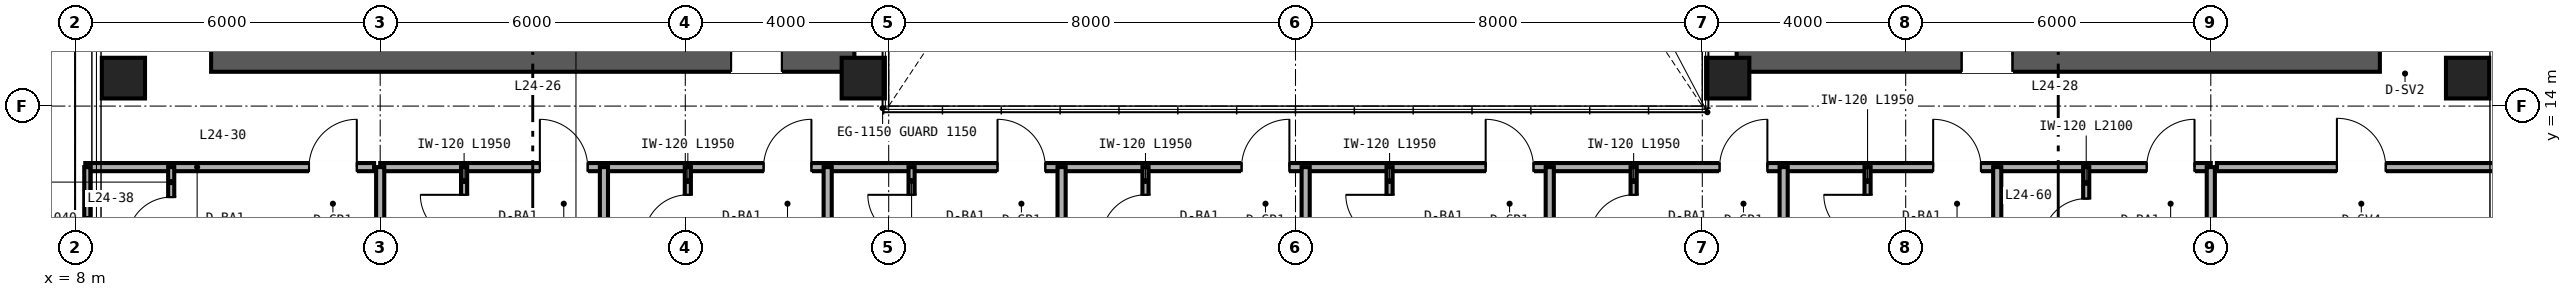
"""IFC4 building model, lengths in metres.
Left out: names, types, materials, properties, quantities, classifications, styles, units other than length and angle.
Written with IfcOpenShell. Run it as: python <this file> out.ifc"""

import sys

from ifc_helpers import new_model, si_unit, direction, frame, frame_2d, origin, origin_2d, place, context, subcontext, project, spatial, rectangle, hollow_rectangle, extrude, source, transform, mapped, element, fill, save


model = new_model("IFC4")
c1 = context("Model", 3, precision=1e-05, world=origin(), true_north=direction((0.0, 1.0)))
c2 = subcontext(c1, "Body", "Model", "MODEL_VIEW")
j1 = project(units=[si_unit("LENGTHUNIT", "METRE"), si_unit("PLANEANGLEUNIT", "RADIAN")], contexts=[c1])
p1 = place(None, origin())
s1 = spatial("IfcSite", under=j1, at=p1, CompositionType="ELEMENT")
p2 = place(p1, origin())
s2 = spatial("IfcBuilding", under=s1, at=p2, CompositionType="ELEMENT")
p3 = place(p2, frame((0.0, 0.0, 100.8)))
s3 = spatial("IfcBuildingStorey", under=s2, at=p3, CompositionType="ELEMENT", Elevation=100.8)
p4 = place(p3, frame((10.675, 15.0, 0.0), z_axis=(0.0, 0.0, 1.0), x_axis=(1.0, 0.0, 0.0)))
e1 = element("IfcWall", 1, at=p4, inside=s3, PredefinedType="SHEAR", context=c2, shape_type="SweptSolid", body=[
    extrude(rectangle(XDim=12.65, YDim=0.65, at=frame_2d((6.325, 0.0))), origin(), (0.0, 0.0, 1.0), 3.36),
])
p5 = place(p4, frame((10.225, 0.0, 0.0)))
e2 = element("IfcOpeningElement", 2, at=p5, cuts=e1, PredefinedType="OPENING", context=c2, shape_type="SweptSolid", body=[
    extrude(rectangle(XDim=1.0, YDim=2.15, at=frame_2d((0.5, 1.075))), frame((0.0, 0.335, 0.0), z_axis=(0.0, -1.0, 0.0), x_axis=(1.0, 0.0, 0.0)), (0.0, 0.0, 1.0), 0.67),
])
p6 = place(p3, frame((40.675, 15.0, 0.0), z_axis=(0.0, 0.0, 1.0), x_axis=(1.0, 0.0, 0.0)))
e3 = element("IfcWall", 3, at=p6, inside=s3, PredefinedType="SHEAR", context=c2, shape_type="SweptSolid", body=[
    extrude(rectangle(XDim=12.65, YDim=0.65, at=frame_2d((6.325, 0.0))), origin(), (0.0, 0.0, 1.0), 3.36),
])
p7 = place(p6, frame((4.425, 0.0, 0.0)))
e4 = element("IfcOpeningElement", 4, at=p7, cuts=e3, PredefinedType="OPENING", context=c2, shape_type="SweptSolid", body=[
    extrude(rectangle(XDim=1.0, YDim=2.15, at=frame_2d((0.5, 1.075))), frame((0.0, 0.335, 0.0), z_axis=(0.0, -1.0, 0.0), x_axis=(1.0, 0.0, 0.0)), (0.0, 0.0, 1.0), 0.67),
])
m1 = source(origin(), c2, "Body", "SweptSolid", [
    extrude(hollow_rectangle(XDim=0.85, YDim=0.8, WallThickness=0.032, at=origin_2d()), origin(), (0.0, 0.0, 1.0), 3.36),
])
for number, where, z_axis, x_axis in (
    (5, (8.95, 14.55, 0.0), (0.0, 0.0, 1.0), (1.0, 0.0, 0.0)),
    (6, (23.5, 14.55, 0.0), (0.0, 0.0, 1.0), (1.0, 0.0, 0.0)),
    (7, (40.5, 14.55, 0.0), (0.0, 0.0, 1.0), (1.0, 0.0, 0.0)),
    (8, (55.05, 14.55, 0.0), (0.0, 0.0, 1.0), (1.0, 0.0, 0.0)),
):
    element("IfcColumn", number, at=place(p3, frame(where, z_axis=z_axis, x_axis=x_axis)), inside=s3, PredefinedType="COLUMN", context=c2, shape_type="MappedRepresentation", body=[
        mapped(m1, transform((0.0, 0.0, 0.0), scale=1.0)),
    ])
p8 = place(p3, frame((8.2, 12.8, 0.0), z_axis=(0.0, 0.0, 1.0), x_axis=(1.0, 0.0, 0.0)))
e9 = element("IfcWall", 9, at=p8, inside=s3, PredefinedType="PARTITIONING", context=c2, shape_type="SweptSolid", body=[
    extrude(rectangle(XDim=5.68, YDim=0.16, at=frame_2d((2.84, 0.0))), origin(), (0.0, 0.0, 1.0), 3.36),
])
p9 = place(p8, frame((4.4, 0.0, 0.0)))
e10 = element("IfcOpeningElement", 10, at=p9, cuts=e9, PredefinedType="OPENING", context=c2, shape_type="SweptSolid", body=[
    extrude(rectangle(XDim=0.94, YDim=2.15, at=frame_2d((0.47, 1.075))), frame((0.0, 0.09, 0.0), z_axis=(0.0, -1.0, 0.0), x_axis=(1.0, 0.0, 0.0)), (0.0, 0.0, 1.0), 0.18),
])
p10 = place(p3, frame((9.89, 10.76, 0.0), z_axis=(0.0, 0.0, 1.0), x_axis=(0.0, 1.0, 0.0)))
e11 = element("IfcWall", 11, at=p10, inside=s3, PredefinedType="PARTITIONING", context=c2, shape_type="SweptSolid", body=[
    extrude(rectangle(XDim=2.04, YDim=0.12, at=frame_2d((1.02, 0.0))), origin(), (0.0, 0.0, 1.0), 3.36),
])
p11 = place(p10, frame((0.59, 0.0, 0.0)))
e12 = element("IfcOpeningElement", 12, at=p11, cuts=e11, PredefinedType="OPENING", context=c2, shape_type="SweptSolid", body=[
    extrude(rectangle(XDim=0.86, YDim=2.1, at=frame_2d((0.43, 1.05))), frame((0.0, 0.07, 0.0), z_axis=(0.0, -1.0, 0.0), x_axis=(1.0, 0.0, 0.0)), (0.0, 0.0, 1.0), 0.14),
])
p12 = place(p3, frame((8.24, 10.76, 0.0), z_axis=(0.0, 0.0, 1.0), x_axis=(0.0, 1.0, 0.0)))
e13 = element("IfcWall", 13, at=p12, inside=s3, PredefinedType="PARTITIONING", context=c2, shape_type="SweptSolid", body=[
    extrude(rectangle(XDim=2.04, YDim=0.12, at=frame_2d((1.02, 0.0))), origin(), (0.0, 0.0, 1.0), 3.36),
])
p13 = place(p3, frame((50.12, 12.8, 0.0), z_axis=(0.0, 0.0, 1.0), x_axis=(1.0, 0.0, 0.0)))
e14 = element("IfcWall", 14, at=p13, inside=s3, PredefinedType="PARTITIONING", context=c2, shape_type="SweptSolid", body=[
    extrude(rectangle(XDim=5.68, YDim=0.16, at=frame_2d((2.84, 0.0))), origin(), (0.0, 0.0, 1.0), 3.36),
])
p14 = place(p13, frame((2.36, 0.0, 0.0)))
e15 = element("IfcOpeningElement", 15, at=p14, cuts=e14, PredefinedType="OPENING", context=c2, shape_type="SweptSolid", body=[
    extrude(rectangle(XDim=0.96, YDim=2.15, at=frame_2d((0.48, 1.075))), frame((0.0, 0.09, 0.0), z_axis=(0.0, -1.0, 0.0), x_axis=(1.0, 0.0, 0.0)), (0.0, 0.0, 1.0), 0.18),
])
p15 = place(p3, frame((14.0, 12.8, 0.0), z_axis=(0.0, 0.0, 1.0), x_axis=(1.0, 0.0, 0.0)))
e16 = element("IfcWall", 16, at=p15, inside=s3, PredefinedType="PARTITIONING", context=c2, shape_type="SweptSolid", body=[
    extrude(rectangle(XDim=36.0, YDim=0.16, at=frame_2d((18.0, 0.0))), origin(), (0.0, 0.0, 1.0), 2.581),
])
p16 = place(p15, frame((3.14, 0.0, 0.0)))
e17 = element("IfcOpeningElement", 17, at=p16, cuts=e16, PredefinedType="OPENING", context=c2, shape_type="SweptSolid", body=[
    extrude(rectangle(XDim=0.94, YDim=2.15, at=frame_2d((0.47, 1.075))), frame((0.0, 0.09, 0.0), z_axis=(0.0, -1.0, 0.0), x_axis=(1.0, 0.0, 0.0)), (0.0, 0.0, 1.0), 0.18),
])
p17 = place(p15, frame((7.54, 0.0, 0.0)))
e18 = element("IfcOpeningElement", 18, at=p17, cuts=e16, PredefinedType="OPENING", context=c2, shape_type="SweptSolid", body=[
    extrude(rectangle(XDim=0.94, YDim=2.15, at=frame_2d((0.47, 1.075))), frame((0.0, 0.09, 0.0), z_axis=(0.0, -1.0, 0.0), x_axis=(1.0, 0.0, 0.0)), (0.0, 0.0, 1.0), 0.18),
])
p18 = place(p15, frame((12.14, 0.0, 0.0)))
e19 = element("IfcOpeningElement", 19, at=p18, cuts=e16, PredefinedType="OPENING", context=c2, shape_type="SweptSolid", body=[
    extrude(rectangle(XDim=0.94, YDim=2.15, at=frame_2d((0.47, 1.075))), frame((0.0, 0.09, 0.0), z_axis=(0.0, -1.0, 0.0), x_axis=(1.0, 0.0, 0.0)), (0.0, 0.0, 1.0), 0.18),
])
p19 = place(p15, frame((16.94, 0.0, 0.0)))
e20 = element("IfcOpeningElement", 20, at=p19, cuts=e16, PredefinedType="OPENING", context=c2, shape_type="SweptSolid", body=[
    extrude(rectangle(XDim=0.94, YDim=2.15, at=frame_2d((0.47, 1.075))), frame((0.0, 0.09, 0.0), z_axis=(0.0, -1.0, 0.0), x_axis=(1.0, 0.0, 0.0)), (0.0, 0.0, 1.0), 0.18),
])
p20 = place(p15, frame((21.74, 0.0, 0.0)))
e21 = element("IfcOpeningElement", 21, at=p20, cuts=e16, PredefinedType="OPENING", context=c2, shape_type="SweptSolid", body=[
    extrude(rectangle(XDim=0.94, YDim=2.15, at=frame_2d((0.47, 1.075))), frame((0.0, 0.09, 0.0), z_axis=(0.0, -1.0, 0.0), x_axis=(1.0, 0.0, 0.0)), (0.0, 0.0, 1.0), 0.18),
])
p21 = place(p15, frame((26.34, 0.0, 0.0)))
e22 = element("IfcOpeningElement", 22, at=p21, cuts=e16, PredefinedType="OPENING", context=c2, shape_type="SweptSolid", body=[
    extrude(rectangle(XDim=0.94, YDim=2.15, at=frame_2d((0.47, 1.075))), frame((0.0, 0.09, 0.0), z_axis=(0.0, -1.0, 0.0), x_axis=(1.0, 0.0, 0.0)), (0.0, 0.0, 1.0), 0.18),
])
p22 = place(p15, frame((30.54, 0.0, 0.0)))
e23 = element("IfcOpeningElement", 23, at=p22, cuts=e16, PredefinedType="OPENING", context=c2, shape_type="SweptSolid", body=[
    extrude(rectangle(XDim=0.94, YDim=2.15, at=frame_2d((0.47, 1.075))), frame((0.0, 0.09, 0.0), z_axis=(0.0, -1.0, 0.0), x_axis=(1.0, 0.0, 0.0)), (0.0, 0.0, 1.0), 0.18),
])
p23 = place(p15, frame((34.74, 0.0, 0.0)))
e24 = element("IfcOpeningElement", 24, at=p23, cuts=e16, PredefinedType="OPENING", context=c2, shape_type="SweptSolid", body=[
    extrude(rectangle(XDim=0.94, YDim=2.15, at=frame_2d((0.47, 1.075))), frame((0.0, 0.09, 0.0), z_axis=(0.0, -1.0, 0.0), x_axis=(1.0, 0.0, 0.0)), (0.0, 0.0, 1.0), 0.18),
])
for number, where, z_axis, x_axis in (
    (25, (14.0, 2.36, 0.0), (0.0, 0.0, 1.0), (0.0, 1.0, 0.0)),
    (26, (50.0, 2.36, 0.0), (0.0, 0.0, 1.0), (0.0, 1.0, 0.0)),
    (27, (18.4, 2.36, 0.0), (0.0, 0.0, 1.0), (0.0, 1.0, 0.0)),
):
    element("IfcWall", number, at=place(p3, frame(where, z_axis=z_axis, x_axis=x_axis)), inside=s3, PredefinedType="PARTITIONING", context=c2, shape_type="SweptSolid", body=[
        extrude(rectangle(XDim=10.44, YDim=0.16, at=frame_2d((5.22, 0.0))), origin(), (0.0, 0.0, 1.0), 2.667),
    ])
p24 = place(p3, frame((15.65, 10.85, 0.0), z_axis=(0.0, 0.0, 1.0), x_axis=(0.0, 1.0, 0.0)))
e28 = element("IfcWall", 28, at=p24, inside=s3, PredefinedType="PARTITIONING", context=c2, shape_type="SweptSolid", body=[
    extrude(rectangle(XDim=1.95, YDim=0.12, at=frame_2d((0.975, 0.0))), origin(), (0.0, 0.0, 1.0), 3.36),
])
p25 = place(p24, frame((0.545, 0.0, 0.0)))
e29 = element("IfcOpeningElement", 29, at=p25, cuts=e28, PredefinedType="OPENING", context=c2, shape_type="SweptSolid", body=[
    extrude(rectangle(XDim=0.86, YDim=2.1, at=frame_2d((0.43, 1.05))), frame((0.0, 0.07, 0.0), z_axis=(0.0, -1.0, 0.0), x_axis=(1.0, 0.0, 0.0)), (0.0, 0.0, 1.0), 0.14),
])
p26 = place(p3, frame((22.8, 2.36, 0.0), z_axis=(0.0, 0.0, 1.0), x_axis=(0.0, 1.0, 0.0)))
e30 = element("IfcWall", 30, at=p26, inside=s3, PredefinedType="PARTITIONING", context=c2, shape_type="SweptSolid", body=[
    extrude(rectangle(XDim=10.44, YDim=0.16, at=frame_2d((5.22, 0.0))), origin(), (0.0, 0.0, 1.0), 2.823),
])
p27 = place(p3, frame((20.05, 10.85, 0.0), z_axis=(0.0, 0.0, 1.0), x_axis=(0.0, 1.0, 0.0)))
e31 = element("IfcWall", 31, at=p27, inside=s3, PredefinedType="PARTITIONING", context=c2, shape_type="SweptSolid", body=[
    extrude(rectangle(XDim=1.95, YDim=0.12, at=frame_2d((0.975, 0.0))), origin(), (0.0, 0.0, 1.0), 3.36),
])
p28 = place(p27, frame((0.545, 0.0, 0.0)))
e32 = element("IfcOpeningElement", 32, at=p28, cuts=e31, PredefinedType="OPENING", context=c2, shape_type="SweptSolid", body=[
    extrude(rectangle(XDim=0.86, YDim=2.1, at=frame_2d((0.43, 1.05))), frame((0.0, 0.07, 0.0), z_axis=(0.0, -1.0, 0.0), x_axis=(1.0, 0.0, 0.0)), (0.0, 0.0, 1.0), 0.14),
])
p29 = place(p3, frame((27.4, 2.36, 0.0), z_axis=(0.0, 0.0, 1.0), x_axis=(0.0, 1.0, 0.0)))
e33 = element("IfcWall", 33, at=p29, inside=s3, PredefinedType="PARTITIONING", context=c2, shape_type="SweptSolid", body=[
    extrude(rectangle(XDim=10.44, YDim=0.16, at=frame_2d((5.22, 0.0))), origin(), (0.0, 0.0, 1.0), 2.433),
])
p30 = place(p3, frame((24.45, 10.85, 0.0), z_axis=(0.0, 0.0, 1.0), x_axis=(0.0, 1.0, 0.0)))
e34 = element("IfcWall", 34, at=p30, inside=s3, PredefinedType="PARTITIONING", context=c2, shape_type="SweptSolid", body=[
    extrude(rectangle(XDim=1.95, YDim=0.12, at=frame_2d((0.975, 0.0))), origin(), (0.0, 0.0, 1.0), 3.36),
])
p31 = place(p30, frame((0.545, 0.0, 0.0)))
e35 = element("IfcOpeningElement", 35, at=p31, cuts=e34, PredefinedType="OPENING", context=c2, shape_type="SweptSolid", body=[
    extrude(rectangle(XDim=0.86, YDim=2.1, at=frame_2d((0.43, 1.05))), frame((0.0, 0.07, 0.0), z_axis=(0.0, -1.0, 0.0), x_axis=(1.0, 0.0, 0.0)), (0.0, 0.0, 1.0), 0.14),
])
p32 = place(p3, frame((32.2, 2.36, 0.0), z_axis=(0.0, 0.0, 1.0), x_axis=(0.0, 1.0, 0.0)))
e36 = element("IfcWall", 36, at=p32, inside=s3, PredefinedType="PARTITIONING", context=c2, shape_type="SweptSolid", body=[
    extrude(rectangle(XDim=10.44, YDim=0.16, at=frame_2d((5.22, 0.0))), origin(), (0.0, 0.0, 1.0), 2.433),
])
p33 = place(p3, frame((29.05, 10.85, 0.0), z_axis=(0.0, 0.0, 1.0), x_axis=(0.0, 1.0, 0.0)))
e37 = element("IfcWall", 37, at=p33, inside=s3, PredefinedType="PARTITIONING", context=c2, shape_type="SweptSolid", body=[
    extrude(rectangle(XDim=1.95, YDim=0.12, at=frame_2d((0.975, 0.0))), origin(), (0.0, 0.0, 1.0), 3.36),
])
p34 = place(p33, frame((0.545, 0.0, 0.0)))
e38 = element("IfcOpeningElement", 38, at=p34, cuts=e37, PredefinedType="OPENING", context=c2, shape_type="SweptSolid", body=[
    extrude(rectangle(XDim=0.86, YDim=2.1, at=frame_2d((0.43, 1.05))), frame((0.0, 0.07, 0.0), z_axis=(0.0, -1.0, 0.0), x_axis=(1.0, 0.0, 0.0)), (0.0, 0.0, 1.0), 0.14),
])
p35 = place(p3, frame((37.0, 2.36, 0.0), z_axis=(0.0, 0.0, 1.0), x_axis=(0.0, 1.0, 0.0)))
e39 = element("IfcWall", 39, at=p35, inside=s3, PredefinedType="PARTITIONING", context=c2, shape_type="SweptSolid", body=[
    extrude(rectangle(XDim=10.44, YDim=0.16, at=frame_2d((5.22, 0.0))), origin(), (0.0, 0.0, 1.0), 2.433),
])
p36 = place(p3, frame((33.85, 10.85, 0.0), z_axis=(0.0, 0.0, 1.0), x_axis=(0.0, 1.0, 0.0)))
e40 = element("IfcWall", 40, at=p36, inside=s3, PredefinedType="PARTITIONING", context=c2, shape_type="SweptSolid", body=[
    extrude(rectangle(XDim=1.95, YDim=0.12, at=frame_2d((0.975, 0.0))), origin(), (0.0, 0.0, 1.0), 3.36),
])
p37 = place(p36, frame((0.545, 0.0, 0.0)))
e41 = element("IfcOpeningElement", 41, at=p37, cuts=e40, PredefinedType="OPENING", context=c2, shape_type="SweptSolid", body=[
    extrude(rectangle(XDim=0.86, YDim=2.1, at=frame_2d((0.43, 1.05))), frame((0.0, 0.07, 0.0), z_axis=(0.0, -1.0, 0.0), x_axis=(1.0, 0.0, 0.0)), (0.0, 0.0, 1.0), 0.14),
])
p38 = place(p3, frame((41.6, 2.36, 0.0), z_axis=(0.0, 0.0, 1.0), x_axis=(0.0, 1.0, 0.0)))
e42 = element("IfcWall", 42, at=p38, inside=s3, PredefinedType="PARTITIONING", context=c2, shape_type="SweptSolid", body=[
    extrude(rectangle(XDim=10.44, YDim=0.16, at=frame_2d((5.22, 0.0))), origin(), (0.0, 0.0, 1.0), 2.823),
])
p39 = place(p3, frame((38.65, 10.85, 0.0), z_axis=(0.0, 0.0, 1.0), x_axis=(0.0, 1.0, 0.0)))
e43 = element("IfcWall", 43, at=p39, inside=s3, PredefinedType="PARTITIONING", context=c2, shape_type="SweptSolid", body=[
    extrude(rectangle(XDim=1.95, YDim=0.12, at=frame_2d((0.975, 0.0))), origin(), (0.0, 0.0, 1.0), 3.36),
])
p40 = place(p39, frame((0.545, 0.0, 0.0)))
e44 = element("IfcOpeningElement", 44, at=p40, cuts=e43, PredefinedType="OPENING", context=c2, shape_type="SweptSolid", body=[
    extrude(rectangle(XDim=0.86, YDim=2.1, at=frame_2d((0.43, 1.05))), frame((0.0, 0.07, 0.0), z_axis=(0.0, -1.0, 0.0), x_axis=(1.0, 0.0, 0.0)), (0.0, 0.0, 1.0), 0.14),
])
p41 = place(p3, frame((45.8, 2.36, 0.0), z_axis=(0.0, 0.0, 1.0), x_axis=(0.0, 1.0, 0.0)))
e45 = element("IfcWall", 45, at=p41, inside=s3, PredefinedType="PARTITIONING", context=c2, shape_type="SweptSolid", body=[
    extrude(rectangle(XDim=10.44, YDim=0.16, at=frame_2d((5.22, 0.0))), origin(), (0.0, 0.0, 1.0), 2.667),
])
p42 = place(p3, frame((43.25, 10.85, 0.0), z_axis=(0.0, 0.0, 1.0), x_axis=(0.0, 1.0, 0.0)))
e46 = element("IfcWall", 46, at=p42, inside=s3, PredefinedType="PARTITIONING", context=c2, shape_type="SweptSolid", body=[
    extrude(rectangle(XDim=1.95, YDim=0.12, at=frame_2d((0.975, 0.0))), origin(), (0.0, 0.0, 1.0), 3.36),
])
p43 = place(p42, frame((0.545, 0.0, 0.0)))
e47 = element("IfcOpeningElement", 47, at=p43, cuts=e46, PredefinedType="OPENING", context=c2, shape_type="SweptSolid", body=[
    extrude(rectangle(XDim=0.86, YDim=2.1, at=frame_2d((0.43, 1.05))), frame((0.0, 0.07, 0.0), z_axis=(0.0, -1.0, 0.0), x_axis=(1.0, 0.0, 0.0)), (0.0, 0.0, 1.0), 0.14),
])
p44 = place(p3, frame((47.55, 10.7, 0.0), z_axis=(0.0, 0.0, 1.0), x_axis=(0.0, 1.0, 0.0)))
e48 = element("IfcWall", 48, at=p44, inside=s3, PredefinedType="PARTITIONING", context=c2, shape_type="SweptSolid", body=[
    extrude(rectangle(XDim=2.1, YDim=0.12, at=frame_2d((1.05, 0.0))), origin(), (0.0, 0.0, 1.0), 3.36),
])
p45 = place(p44, frame((0.62, 0.0, 0.0)))
e49 = element("IfcOpeningElement", 49, at=p45, cuts=e48, PredefinedType="OPENING", context=c2, shape_type="SweptSolid", body=[
    extrude(rectangle(XDim=0.86, YDim=2.1, at=frame_2d((0.43, 1.05))), frame((0.0, 0.07, 0.0), z_axis=(0.0, -1.0, 0.0), x_axis=(1.0, 0.0, 0.0)), (0.0, 0.0, 1.0), 0.14),
])
m2 = source(origin(), c2, "Body", "SweptSolid", [
    extrude(rectangle(XDim=1.0, YDim=2.15, at=frame_2d((0.5, 1.075))), frame((0.0, 0.025, 0.0), z_axis=(0.0, -1.0, 0.0), x_axis=(1.0, 0.0, 0.0)), (0.0, 0.0, 1.0), 0.05),
])
p46 = place(p5, origin())
e50 = element("IfcDoor", 50, at=p46, inside=s3, OperationType="SINGLE_SWING_LEFT", PredefinedType="DOOR", context=c2, shape_type="MappedRepresentation", body=[
    mapped(m2, transform((0.0, 0.0, 0.0), scale=1.0)),
])
fill(e2, e50)
p47 = place(p7, origin())
e51 = element("IfcDoor", 51, at=p47, inside=s3, OperationType="SINGLE_SWING_RIGHT", PredefinedType="DOOR", context=c2, shape_type="MappedRepresentation", body=[
    mapped(m2, transform((0.0, 0.0, 0.0), scale=1.0)),
])
fill(e4, e51)
m3 = source(origin(), c2, "Body", "SweptSolid", [
    extrude(rectangle(XDim=0.86, YDim=2.1, at=frame_2d((0.43, 1.05))), frame((0.0, 0.025, 0.0), z_axis=(0.0, -1.0, 0.0), x_axis=(1.0, 0.0, 0.0)), (0.0, 0.0, 1.0), 0.05),
])
p48 = place(p11, origin())
e52 = element("IfcDoor", 52, at=p48, inside=s3, OperationType="SINGLE_SWING_LEFT", PredefinedType="DOOR", context=c2, shape_type="MappedRepresentation", body=[
    mapped(m3, transform((0.0, 0.0, 0.0), scale=1.0)),
])
fill(e12, e52)
m4 = source(origin(), c2, "Body", "SweptSolid", [
    extrude(rectangle(XDim=0.94, YDim=2.15, at=frame_2d((0.47, 1.075))), frame((0.0, 0.025, 0.0), z_axis=(0.0, -1.0, 0.0), x_axis=(1.0, 0.0, 0.0)), (0.0, 0.0, 1.0), 0.05),
])
p49 = place(p9, origin())
e53 = element("IfcDoor", 53, at=p49, inside=s3, OperationType="SINGLE_SWING_RIGHT", PredefinedType="DOOR", context=c2, shape_type="MappedRepresentation", body=[
    mapped(m4, transform((0.0, 0.0, 0.0), scale=1.0)),
])
fill(e10, e53)
m5 = source(origin(), c2, "Body", "SweptSolid", [
    extrude(rectangle(XDim=0.96, YDim=2.15, at=frame_2d((0.48, 1.075))), frame((0.0, 0.025, 0.0), z_axis=(0.0, -1.0, 0.0), x_axis=(1.0, 0.0, 0.0)), (0.0, 0.0, 1.0), 0.05),
])
p50 = place(p14, origin())
e54 = element("IfcDoor", 54, at=p50, inside=s3, OperationType="SINGLE_SWING_LEFT", PredefinedType="DOOR", context=c2, shape_type="MappedRepresentation", body=[
    mapped(m5, transform((0.0, 0.0, 0.0), scale=1.0)),
])
fill(e15, e54)
p51 = place(p25, origin())
e55 = element("IfcDoor", 55, at=p51, inside=s3, OperationType="SINGLE_SWING_RIGHT", PredefinedType="DOOR", context=c2, shape_type="MappedRepresentation", body=[
    mapped(m3, transform((0.0, 0.0, 0.0), scale=1.0)),
])
fill(e29, e55)
p52 = place(p28, origin())
e56 = element("IfcDoor", 56, at=p52, inside=s3, OperationType="SINGLE_SWING_LEFT", PredefinedType="DOOR", context=c2, shape_type="MappedRepresentation", body=[
    mapped(m3, transform((0.0, 0.0, 0.0), scale=1.0)),
])
fill(e32, e56)
p53 = place(p31, origin())
e57 = element("IfcDoor", 57, at=p53, inside=s3, OperationType="SINGLE_SWING_RIGHT", PredefinedType="DOOR", context=c2, shape_type="MappedRepresentation", body=[
    mapped(m3, transform((0.0, 0.0, 0.0), scale=1.0)),
])
fill(e35, e57)
p54 = place(p34, origin())
e58 = element("IfcDoor", 58, at=p54, inside=s3, OperationType="SINGLE_SWING_LEFT", PredefinedType="DOOR", context=c2, shape_type="MappedRepresentation", body=[
    mapped(m3, transform((0.0, 0.0, 0.0), scale=1.0)),
])
fill(e38, e58)
p55 = place(p37, origin())
e59 = element("IfcDoor", 59, at=p55, inside=s3, OperationType="SINGLE_SWING_RIGHT", PredefinedType="DOOR", context=c2, shape_type="MappedRepresentation", body=[
    mapped(m3, transform((0.0, 0.0, 0.0), scale=1.0)),
])
fill(e41, e59)
p56 = place(p40, origin())
e60 = element("IfcDoor", 60, at=p56, inside=s3, OperationType="SINGLE_SWING_LEFT", PredefinedType="DOOR", context=c2, shape_type="MappedRepresentation", body=[
    mapped(m3, transform((0.0, 0.0, 0.0), scale=1.0)),
])
fill(e44, e60)
p57 = place(p43, origin())
e61 = element("IfcDoor", 61, at=p57, inside=s3, OperationType="SINGLE_SWING_RIGHT", PredefinedType="DOOR", context=c2, shape_type="MappedRepresentation", body=[
    mapped(m3, transform((0.0, 0.0, 0.0), scale=1.0)),
])
fill(e47, e61)
p58 = place(p45, origin())
e62 = element("IfcDoor", 62, at=p58, inside=s3, OperationType="SINGLE_SWING_LEFT", PredefinedType="DOOR", context=c2, shape_type="MappedRepresentation", body=[
    mapped(m3, transform((0.0, 0.0, 0.0), scale=1.0)),
])
fill(e49, e62)
p59 = place(p16, origin())
e63 = element("IfcDoor", 63, at=p59, inside=s3, OperationType="SINGLE_SWING_LEFT", PredefinedType="DOOR", context=c2, shape_type="MappedRepresentation", body=[
    mapped(m4, transform((0.0, 0.0, 0.0), scale=1.0)),
])
fill(e17, e63)
p60 = place(p17, origin())
e64 = element("IfcDoor", 64, at=p60, inside=s3, OperationType="SINGLE_SWING_RIGHT", PredefinedType="DOOR", context=c2, shape_type="MappedRepresentation", body=[
    mapped(m4, transform((0.0, 0.0, 0.0), scale=1.0)),
])
fill(e18, e64)
p61 = place(p18, origin())
e65 = element("IfcDoor", 65, at=p61, inside=s3, OperationType="SINGLE_SWING_LEFT", PredefinedType="DOOR", context=c2, shape_type="MappedRepresentation", body=[
    mapped(m4, transform((0.0, 0.0, 0.0), scale=1.0)),
])
fill(e19, e65)
p62 = place(p19, origin())
e66 = element("IfcDoor", 66, at=p62, inside=s3, OperationType="SINGLE_SWING_RIGHT", PredefinedType="DOOR", context=c2, shape_type="MappedRepresentation", body=[
    mapped(m4, transform((0.0, 0.0, 0.0), scale=1.0)),
])
fill(e20, e66)
p63 = place(p20, origin())
e67 = element("IfcDoor", 67, at=p63, inside=s3, OperationType="SINGLE_SWING_LEFT", PredefinedType="DOOR", context=c2, shape_type="MappedRepresentation", body=[
    mapped(m4, transform((0.0, 0.0, 0.0), scale=1.0)),
])
fill(e21, e67)
p64 = place(p21, origin())
e68 = element("IfcDoor", 68, at=p64, inside=s3, OperationType="SINGLE_SWING_RIGHT", PredefinedType="DOOR", context=c2, shape_type="MappedRepresentation", body=[
    mapped(m4, transform((0.0, 0.0, 0.0), scale=1.0)),
])
fill(e22, e68)
p65 = place(p22, origin())
e69 = element("IfcDoor", 69, at=p65, inside=s3, OperationType="SINGLE_SWING_LEFT", PredefinedType="DOOR", context=c2, shape_type="MappedRepresentation", body=[
    mapped(m4, transform((0.0, 0.0, 0.0), scale=1.0)),
])
fill(e23, e69)
p66 = place(p23, origin())
e70 = element("IfcDoor", 70, at=p66, inside=s3, OperationType="SINGLE_SWING_RIGHT", PredefinedType="DOOR", context=c2, shape_type="MappedRepresentation", body=[
    mapped(m4, transform((0.0, 0.0, 0.0), scale=1.0)),
])
fill(e24, e70)
save(model, sys.argv[1])
